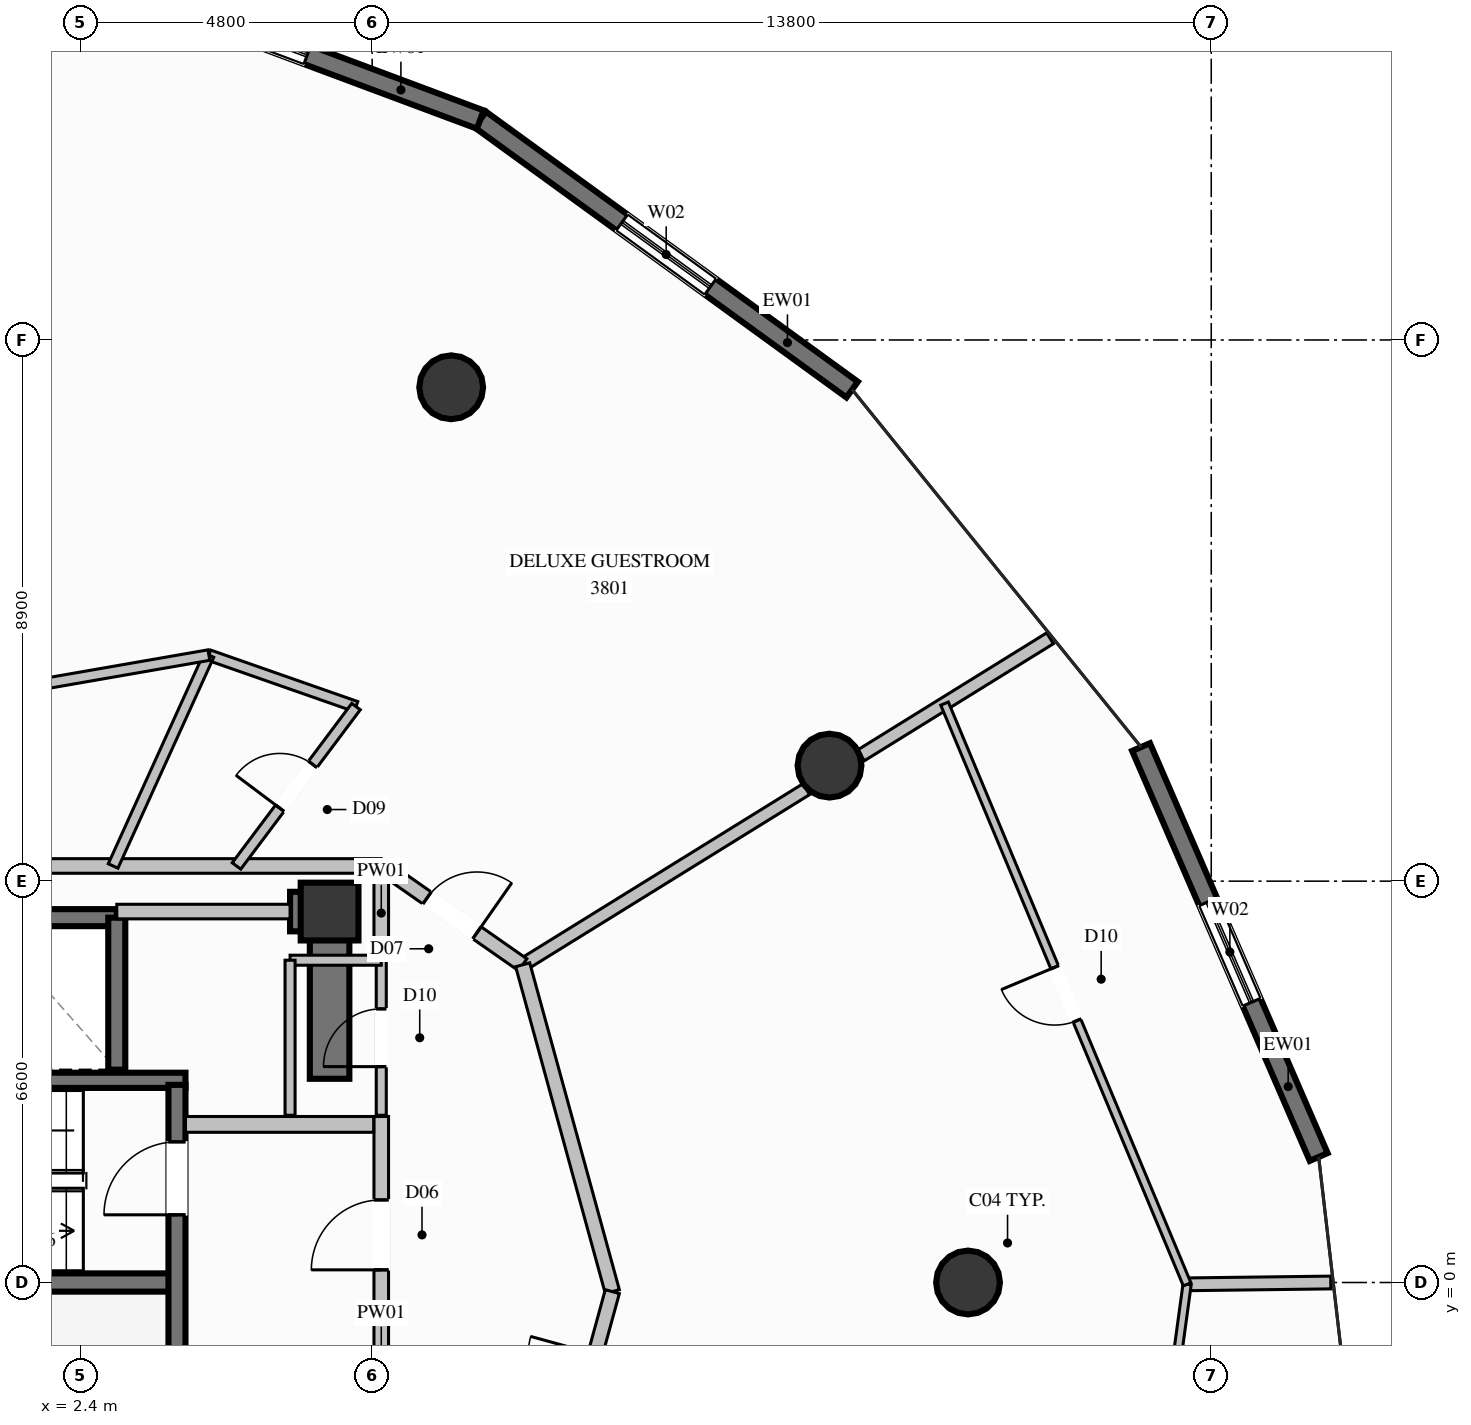
"""IFC4 building model, lengths in metres.
Left out: names, types, materials, properties, quantities, classifications, styles, units other than length and angle.
Written with IfcOpenShell. Run it as: python <this file> out.ifc"""

import sys

from ifc_helpers import new_model, si_unit, direction, frame, frame_2d, origin, origin_2d, place, context, subcontext, project, spatial, rectangle, circle, extrude, element, fill, save


model = new_model("IFC4")
c1 = context("Model", 3, precision=1e-05, world=origin(), true_north=direction((0.0, 1.0)))
c2 = subcontext(c1, "Body", "Model", "MODEL_VIEW")
j1 = project(units=[si_unit("LENGTHUNIT", "METRE"), si_unit("PLANEANGLEUNIT", "RADIAN")], contexts=[c1])
p1 = place(None, origin())
s1 = spatial("IfcSite", under=j1, at=p1, CompositionType="ELEMENT")
p2 = place(p1, origin())
s2 = spatial("IfcBuilding", under=s1, at=p2, CompositionType="ELEMENT")
p3 = place(p2, frame((0.0, 0.0, 142.2)))
s3 = spatial("IfcBuildingStorey", under=s2, at=p3, CompositionType="ELEMENT", Elevation=142.2)
p4 = place(p3, frame((6.5, 6.1, 0.0), z_axis=(0.0, 0.0, 1.0), x_axis=(1.0, 0.0, 0.0)))
e1 = element("IfcColumn", 1, at=p4, inside=s3, PredefinedType="COLUMN", context=c2, shape_type="SweptSolid", body=[
    extrude(rectangle(XDim=0.95, YDim=0.95, at=origin_2d()), origin(), (0.0, 0.0, 1.0), 3.6),
])
p5 = place(p3, frame((-3.99, 0.0, 0.0), z_axis=(0.0, 0.0, 1.0), x_axis=(1.0, 0.0, 0.0)))
e2 = element("IfcWall", 2, at=p5, inside=s3, PredefinedType="SHEAR", context=c2, shape_type="SweptSolid", body=[
    extrude(rectangle(XDim=7.98, YDim=0.3, at=frame_2d((3.99, 0.0))), origin(), (0.0, 0.0, 1.0), 3.6),
])
p6 = place(p3, frame((-4.13, 3.325, 0.0), z_axis=(0.0, 0.0, 1.0), x_axis=(1.0, 0.0, 0.0)))
e3 = element("IfcWall", 3, at=p6, inside=s3, PredefinedType="SOLIDWALL", context=c2, shape_type="SweptSolid", body=[
    extrude(rectangle(XDim=8.26, YDim=0.25, at=frame_2d((4.13, 0.0))), origin(), (0.0, 0.0, 1.0), 3.6),
])
p7 = place(p3, frame((5.85, 6.1, 0.0), z_axis=(0.0, 0.0, 1.0), x_axis=(1.0, 0.0, 0.0)))
e4 = element("IfcWall", 4, at=p7, inside=s3, PredefinedType="SHEAR", context=c2, shape_type="SweptSolid", body=[
    extrude(rectangle(XDim=0.325, YDim=0.65, at=frame_2d((0.163, 0.0))), origin(), (0.0, 0.0, 1.0), 3.6),
])
p8 = place(p3, frame((6.5, 3.35, 0.0), z_axis=(0.0, 0.0, 1.0), x_axis=(0.0, 1.0, 0.0)))
e5 = element("IfcWall", 5, at=p8, inside=s3, PredefinedType="SHEAR", context=c2, shape_type="SweptSolid", body=[
    extrude(rectangle(XDim=3.075, YDim=0.65, at=frame_2d((1.538, 0.0))), origin(), (0.0, 0.0, 1.0), 3.6),
])
for number, where, z_axis, x_axis in (
    (6, (17.0, 0.0, 0.0), (0.0, 0.0, 1.0), (1.0, 0.0, 0.0)),
    (7, (14.722, 8.5, 0.0), (0.0, 0.0, 1.0), (1.0, 0.0, 0.0)),
    (8, (8.5, 14.722, 0.0), (0.0, 0.0, 1.0), (1.0, 0.0, 0.0)),
):
    element("IfcColumn", number, at=place(p3, frame(where, z_axis=z_axis, x_axis=x_axis)), inside=s3, PredefinedType="COLUMN", context=c2, shape_type="SweptSolid", body=[
        extrude(circle(Radius=0.525, at=origin_2d()), origin(), (0.0, 0.0, 1.0), 3.6),
    ])
p9 = place(p3, frame((19.846, 8.805, 0.0), z_axis=(0.0, 0.0, 1.0), x_axis=(0.39761396578, -0.917552796419, 0.0)))
e9 = element("IfcWall", 9, at=p9, inside=s3, PredefinedType="SOLIDWALL", context=c2, shape_type="SweptSolid", body=[
    extrude(rectangle(XDim=7.347, YDim=0.32, at=frame_2d((3.673, 0.0))), origin(), (0.0, 0.0, 1.0), 3.35),
])
p10 = place(p9, frame((2.773, 0.0, 0.35)))
e10 = element("IfcOpeningElement", 10, at=p10, cuts=e9, PredefinedType="OPENING", context=c2, shape_type="SweptSolid", body=[
    extrude(rectangle(XDim=1.8, YDim=2.6, at=frame_2d((0.9, 1.3))), frame((0.0, 0.17, 0.0), z_axis=(0.0, -1.0, 0.0), x_axis=(1.0, 0.0, 0.0)), (0.0, 0.0, 1.0), 0.34),
])
p11 = place(p3, frame((8.978, 19.125, 0.0), z_axis=(0.0, 0.0, 1.0), x_axis=(0.809180040303, -0.587560773347, 0.0)))
e11 = element("IfcWall", 11, at=p11, inside=s3, PredefinedType="SOLIDWALL", context=c2, shape_type="SweptSolid", body=[
    extrude(rectangle(XDim=7.558, YDim=0.32, at=frame_2d((3.779, 0.0))), origin(), (0.0, 0.0, 1.0), 3.35),
])
p12 = place(p11, frame((2.879, 0.0, 0.35)))
e12 = element("IfcOpeningElement", 12, at=p12, cuts=e11, PredefinedType="OPENING", context=c2, shape_type="SweptSolid", body=[
    extrude(rectangle(XDim=1.8, YDim=2.6, at=frame_2d((0.9, 1.3))), frame((0.0, 0.17, 0.0), z_axis=(0.0, -1.0, 0.0), x_axis=(1.0, 0.0, 0.0)), (0.0, 0.0, 1.0), 0.34),
])
p13 = place(p3, frame((2.095, 21.695, 0.0), z_axis=(0.0, 0.0, 1.0), x_axis=(0.936823947669, -0.349801216512, 0.0)))
e13 = element("IfcWall", 13, at=p13, inside=s3, PredefinedType="SOLIDWALL", context=c2, shape_type="SweptSolid", body=[
    extrude(rectangle(XDim=7.347, YDim=0.32, at=frame_2d((3.674, 0.0))), origin(), (0.0, 0.0, 1.0), 3.35),
])
p14 = place(p13, frame((2.511, 0.0, 0.35)))
e14 = element("IfcOpeningElement", 14, at=p14, cuts=e13, PredefinedType="OPENING", context=c2, shape_type="SweptSolid", body=[
    extrude(rectangle(XDim=1.8, YDim=2.6, at=frame_2d((0.9, 1.3))), frame((0.0, 0.17, 0.0), z_axis=(0.0, -1.0, 0.0), x_axis=(1.0, 0.0, 0.0)), (0.0, 0.0, 1.0), 0.34),
])
p15 = place(p3, frame((3.0, 6.0, 0.0), z_axis=(0.0, 0.0, 1.0), x_axis=(-1.0, 0.0, 0.0)))
e15 = element("IfcWall", 15, at=p15, inside=s3, PredefinedType="SOLIDWALL", context=c2, shape_type="SweptSolid", body=[
    extrude(rectangle(XDim=2.2, YDim=0.28, at=frame_2d((1.1, 0.0))), origin(), (0.0, 0.0, 1.0), 3.35),
])
p16 = place(p3, frame((3.0, 3.5, 0.0), z_axis=(0.0, 0.0, 1.0), x_axis=(0.0, 1.0, 0.0)))
e16 = element("IfcWall", 16, at=p16, inside=s3, PredefinedType="SOLIDWALL", context=c2, shape_type="SweptSolid", body=[
    extrude(rectangle(XDim=2.5, YDim=0.28, at=frame_2d((1.25, 0.0))), origin(), (0.0, 0.0, 1.0), 3.35),
])
p17 = place(p3, frame((3.99, -2.21, 0.0), z_axis=(0.0, 0.0, 1.0), x_axis=(0.0, 1.0, 0.0)))
e17 = element("IfcWall", 17, at=p17, inside=s3, PredefinedType="SOLIDWALL", context=c2, shape_type="SweptSolid", body=[
    extrude(rectangle(XDim=5.46, YDim=0.28, at=frame_2d((2.73, 0.0))), origin(), (0.0, 0.0, 1.0), 3.35),
])
p18 = place(p17, frame((3.323, 0.0, 0.0)))
e18 = element("IfcOpeningElement", 18, at=p18, cuts=e17, PredefinedType="OPENING", context=c2, shape_type="SweptSolid", body=[
    extrude(rectangle(XDim=1.2, YDim=2.2, at=frame_2d((0.6, 1.1))), frame((0.0, 0.15, 0.0), z_axis=(0.0, -1.0, 0.0), x_axis=(1.0, 0.0, 0.0)), (0.0, 0.0, 1.0), 0.3),
])
p19 = place(p3, frame((7.35, -2.34, 0.0), z_axis=(0.0, 0.0, 1.0), x_axis=(0.0, 1.0, 0.0)))
e19 = element("IfcWall", 19, at=p19, inside=s3, PredefinedType="PARTITIONING", context=c2, shape_type="SweptSolid", body=[
    extrude(rectangle(XDim=5.07, YDim=0.24, at=frame_2d((2.535, 0.0))), origin(), (0.0, 0.0, 1.0), 2.435),
])
p20 = place(p19, frame((2.548, 0.0, 0.0)))
e20 = element("IfcOpeningElement", 20, at=p20, cuts=e19, PredefinedType="OPENING", context=c2, shape_type="SweptSolid", body=[
    extrude(rectangle(XDim=1.15, YDim=2.2, at=frame_2d((0.575, 1.1))), frame((0.0, 0.13, 0.0), z_axis=(0.0, -1.0, 0.0), x_axis=(1.0, 0.0, 0.0)), (0.0, 0.0, 1.0), 0.26),
])
p21 = place(p3, frame((4.13, 2.6, 0.0), z_axis=(0.0, 0.0, 1.0), x_axis=(1.0, 0.0, 0.0)))
e21 = element("IfcWall", 21, at=p21, inside=s3, PredefinedType="PARTITIONING", context=c2, shape_type="SweptSolid", body=[
    extrude(rectangle(XDim=3.095, YDim=0.26, at=frame_2d((1.548, 0.0))), origin(), (0.0, 0.0, 1.0), 3.35),
])
p22 = place(p3, frame((-7.35, 6.85, 0.0), z_axis=(0.0, 0.0, 1.0), x_axis=(1.0, 0.0, 0.0)))
e22 = element("IfcWall", 22, at=p22, inside=s3, PredefinedType="PARTITIONING", context=c2, shape_type="SweptSolid", body=[
    extrude(rectangle(XDim=14.7, YDim=0.24, at=frame_2d((7.35, 0.0))), origin(), (0.0, 0.0, 1.0), 2.435),
])
p23 = place(p3, frame((7.35, 5.3, 0.0), z_axis=(0.0, 0.0, 1.0), x_axis=(0.0, 1.0, 0.0)))
e23 = element("IfcWall", 23, at=p23, inside=s3, PredefinedType="PARTITIONING", context=c2, shape_type="SweptSolid", body=[
    extrude(rectangle(XDim=1.55, YDim=0.24, at=frame_2d((0.775, 0.0))), origin(), (0.0, 0.0, 1.0), 2.435),
])
p24 = place(p3, frame((3.0, 6.1, 0.0), z_axis=(0.0, 0.0, 1.0), x_axis=(1.0, 0.0, 0.0)))
e24 = element("IfcWall", 24, at=p24, inside=s3, PredefinedType="PARTITIONING", context=c2, shape_type="SweptSolid", body=[
    extrude(rectangle(XDim=2.85, YDim=0.24, at=frame_2d((1.425, 0.0))), origin(), (0.0, 0.0, 1.0), 2.435),
])
p25 = place(p3, frame((7.35, 2.75, 0.0), z_axis=(0.0, 0.0, 1.0), x_axis=(0.0, 1.0, 0.0)))
e25 = element("IfcWall", 25, at=p25, inside=s3, PredefinedType="PARTITIONING", context=c2, shape_type="SweptSolid", body=[
    extrude(rectangle(XDim=2.55, YDim=0.165, at=frame_2d((1.275, 0.0))), origin(), (0.0, 0.0, 1.0), 3.35),
])
p26 = place(p25, frame((0.8, 0.0, 0.0)))
e26 = element("IfcOpeningElement", 26, at=p26, cuts=e25, PredefinedType="OPENING", context=c2, shape_type="SweptSolid", body=[
    extrude(rectangle(XDim=0.95, YDim=2.1, at=frame_2d((0.475, 1.05))), frame((0.0, 0.093, 0.0), z_axis=(0.0, -1.0, 0.0), x_axis=(1.0, 0.0, 0.0)), (0.0, 0.0, 1.0), 0.185),
])
p27 = place(p3, frame((7.35, 5.3, 0.0), z_axis=(0.0, 0.0, 1.0), x_axis=(-1.0, 0.0, 0.0)))
e27 = element("IfcWall", 27, at=p27, inside=s3, PredefinedType="PARTITIONING", context=c2, shape_type="SweptSolid", body=[
    extrude(rectangle(XDim=1.5, YDim=0.165, at=frame_2d((0.75, 0.0))), origin(), (0.0, 0.0, 1.0), 2.435),
])
p28 = place(p3, frame((5.85, 5.3, 0.0), z_axis=(0.0, 0.0, 1.0), x_axis=(0.0, -1.0, 0.0)))
e28 = element("IfcWall", 28, at=p28, inside=s3, PredefinedType="PARTITIONING", context=c2, shape_type="SweptSolid", body=[
    extrude(rectangle(XDim=2.55, YDim=0.165, at=frame_2d((1.275, 0.0))), origin(), (0.0, 0.0, 1.0), 2.435),
])
p29 = place(p3, frame((9.676, 5.225, 0.0), z_axis=(0.0, 0.0, 1.0), x_axis=(0.850241428679, 0.526392926394, 0.0)))
e29 = element("IfcWall", 29, at=p29, inside=s3, PredefinedType="PARTITIONING", context=c2, shape_type="SweptSolid", body=[
    extrude(rectangle(XDim=5.484, YDim=0.21, at=frame_2d((2.742, 0.0))), origin(), (0.0, 0.0, 1.0), 2.718),
])
p30 = place(p3, frame((15.24, 8.669, 0.0), z_axis=(0.0, 0.0, 1.0), x_axis=(0.850222459569, 0.526423564484, 0.0)))
e30 = element("IfcWall", 30, at=p30, inside=s3, PredefinedType="PARTITIONING", context=c2, shape_type="SweptSolid", body=[
    extrude(rectangle(XDim=3.657, YDim=0.21, at=frame_2d((1.828, 0.0))), origin(), (0.0, 0.0, 1.0), 3.35),
])
p31 = place(p3, frame((4.515, 10.318, 0.0), z_axis=(0.0, 0.0, 1.0), x_axis=(0.943844996107, -0.330388594421, 0.0)))
e31 = element("IfcWall", 31, at=p31, inside=s3, PredefinedType="PLUMBINGWALL", context=c2, shape_type="SweptSolid", body=[
    extrude(rectangle(XDim=2.564, YDim=0.175, at=frame_2d((1.282, 0.0))), origin(), (0.0, 0.0, 1.0), 3.35),
])
p32 = place(p3, frame((4.515, 10.318, 0.0), z_axis=(0.0, 0.0, 1.0), x_axis=(-0.413493846923, -0.910506912965, 0.0)))
e32 = element("IfcWall", 32, at=p32, inside=s3, PredefinedType="PLUMBINGWALL", context=c2, shape_type="SweptSolid", body=[
    extrude(rectangle(XDim=3.809, YDim=0.175, at=frame_2d((1.904, 0.0))), origin(), (0.0, 0.0, 1.0), 3.35),
])
p33 = place(p3, frame((4.969, 6.85, 0.0), z_axis=(0.0, 0.0, 1.0), x_axis=(0.600083455504, 0.79993740157, 0.0)))
e33 = element("IfcWall", 33, at=p33, inside=s3, PredefinedType="PLUMBINGWALL", context=c2, shape_type="SweptSolid", body=[
    extrude(rectangle(XDim=3.276, YDim=0.175, at=frame_2d((1.638, 0.0))), origin(), (0.0, 0.0, 1.0), 2.718),
])
p34 = place(p33, frame((1.188, 0.0, 0.0)))
e34 = element("IfcOpeningElement", 34, at=p34, cuts=e33, PredefinedType="OPENING", context=c2, shape_type="SweptSolid", body=[
    extrude(rectangle(XDim=0.9, YDim=2.1, at=frame_2d((0.45, 1.05))), frame((0.0, 0.098, 0.0), z_axis=(0.0, -1.0, 0.0), x_axis=(1.0, 0.0, 0.0)), (0.0, 0.0, 1.0), 0.195),
])
p35 = place(p3, frame((7.35, 6.85, 0.0), z_axis=(0.0, 0.0, 1.0), x_axis=(0.819753050647, -0.57271715179, 0.0)))
e35 = element("IfcWall", 35, at=p35, inside=s3, PredefinedType="PARTITIONING", context=c2, shape_type="SweptSolid", body=[
    extrude(rectangle(XDim=2.837, YDim=0.24, at=frame_2d((1.419, 0.0))), origin(), (0.0, 0.0, 1.0), 3.35),
])
p36 = place(p35, frame((0.919, 0.0, 0.0)))
e36 = element("IfcOpeningElement", 36, at=p36, cuts=e35, PredefinedType="OPENING", context=c2, shape_type="SweptSolid", body=[
    extrude(rectangle(XDim=1.0, YDim=2.2, at=frame_2d((0.5, 1.1))), frame((0.0, 0.13, 0.0), z_axis=(0.0, -1.0, 0.0), x_axis=(1.0, 0.0, 0.0)), (0.0, 0.0, 1.0), 0.26),
])
p37 = place(p3, frame((0.117, 9.553, 0.0), z_axis=(0.0, 0.0, 1.0), x_axis=(0.985201316569, 0.171401183864, 0.0)))
e37 = element("IfcWall", 37, at=p37, inside=s3, PredefinedType="PLUMBINGWALL", context=c2, shape_type="SweptSolid", body=[
    extrude(rectangle(XDim=4.464, YDim=0.175, at=frame_2d((2.232, 0.0))), origin(), (0.0, 0.0, 1.0), 3.35),
])
p38 = place(p3, frame((20.603, -0.03, 0.0), z_axis=(0.0, 0.0, 1.0), x_axis=(0.999919264108, 0.012706898387, 0.0)))
e38 = element("IfcWall", 38, at=p38, inside=s3, PredefinedType="PARTITIONING", context=c2, shape_type="SweptSolid", body=[
    extrude(rectangle(XDim=2.363, YDim=0.21, at=frame_2d((1.182, 0.0))), origin(), (0.0, 0.0, 1.0), 3.35),
])
p39 = place(p3, frame((11.15, -0.15, 0.0), z_axis=(0.0, 0.0, 1.0), x_axis=(-0.264447801629, 0.964400000111, 0.0)))
e39 = element("IfcWall", 39, at=p39, inside=s3, PredefinedType="PARTITIONING", context=c2, shape_type="SweptSolid", body=[
    extrude(rectangle(XDim=5.573, YDim=0.24, at=frame_2d((2.787, 0.0))), origin(), (0.0, 0.0, 1.0), 3.35),
])
p40 = place(p3, frame((10.295, -3.268, 0.0), z_axis=(0.0, 0.0, 1.0), x_axis=(0.264433345006, 0.96440396414, 0.0)))
e40 = element("IfcWall", 40, at=p40, inside=s3, PredefinedType="PARTITIONING", context=c2, shape_type="SweptSolid", body=[
    extrude(rectangle(XDim=3.233, YDim=0.24, at=frame_2d((1.617, 0.0))), origin(), (0.0, 0.0, 1.0), 3.35),
])
p41 = place(p40, frame((1.067, 0.0, 0.0)))
e41 = element("IfcOpeningElement", 41, at=p41, cuts=e40, PredefinedType="OPENING", context=c2, shape_type="SweptSolid", body=[
    extrude(rectangle(XDim=1.1, YDim=2.3, at=frame_2d((0.55, 1.15))), frame((0.0, 0.13, 0.0), z_axis=(0.0, -1.0, 0.0), x_axis=(1.0, 0.0, 0.0)), (0.0, 0.0, 1.0), 0.26),
])
p42 = place(p3, frame((19.104, -11.018, 0.0), z_axis=(0.0, 0.0, 1.0), x_axis=(0.135171166516, 0.990822262438, 0.0)))
e42 = element("IfcWall", 42, at=p42, inside=s3, PredefinedType="PARTITIONING", context=c2, shape_type="SweptSolid", body=[
    extrude(rectangle(XDim=11.09, YDim=0.135, at=frame_2d((5.545, 0.0))), origin(), (0.0, 0.0, 1.0), 3.35),
])
p43 = place(p42, frame((5.07, 0.0, 0.0)))
e43 = element("IfcOpeningElement", 43, at=p43, cuts=e42, PredefinedType="OPENING", context=c2, shape_type="SweptSolid", body=[
    extrude(rectangle(XDim=0.95, YDim=2.1, at=frame_2d((0.475, 1.05))), frame((0.0, 0.078, 0.0), z_axis=(0.0, -1.0, 0.0), x_axis=(1.0, 0.0, 0.0)), (0.0, 0.0, 1.0), 0.155),
])
p44 = place(p3, frame((20.603, -0.03, 0.0), z_axis=(0.0, 0.0, 1.0), x_axis=(-0.385424249403, 0.922739480012, 0.0)))
e44 = element("IfcWall", 44, at=p44, inside=s3, PredefinedType="PARTITIONING", context=c2, shape_type="SweptSolid", body=[
    extrude(rectangle(XDim=10.35, YDim=0.135, at=frame_2d((5.175, 0.0))), origin(), (0.0, 0.0, 1.0), 3.35),
])
p45 = place(p44, frame((4.7, 0.0, 0.0)))
e45 = element("IfcOpeningElement", 45, at=p45, cuts=e44, PredefinedType="OPENING", context=c2, shape_type="SweptSolid", body=[
    extrude(rectangle(XDim=0.95, YDim=2.1, at=frame_2d((0.475, 1.05))), frame((0.0, 0.078, 0.0), z_axis=(0.0, -1.0, 0.0), x_axis=(1.0, 0.0, 0.0)), (0.0, 0.0, 1.0), 0.155),
])
p46 = place(p10, origin())
e46 = element("IfcWindow", 46, at=p46, inside=s3, PartitioningType="SINGLE_PANEL", PredefinedType="WINDOW", context=c2, shape_type="SweptSolid", body=[
    extrude(rectangle(XDim=1.8, YDim=2.6, at=frame_2d((0.9, 1.3))), frame((0.0, 0.03, 0.0), z_axis=(0.0, -1.0, 0.0), x_axis=(1.0, 0.0, 0.0)), (0.0, 0.0, 1.0), 0.06),
])
fill(e10, e46)
p47 = place(p12, origin())
e47 = element("IfcWindow", 47, at=p47, inside=s3, PartitioningType="SINGLE_PANEL", PredefinedType="WINDOW", context=c2, shape_type="SweptSolid", body=[
    extrude(rectangle(XDim=1.8, YDim=2.6, at=frame_2d((0.9, 1.3))), frame((0.0, 0.03, 0.0), z_axis=(0.0, -1.0, 0.0), x_axis=(1.0, 0.0, 0.0)), (0.0, 0.0, 1.0), 0.06),
])
fill(e12, e47)
p48 = place(p14, origin())
e48 = element("IfcWindow", 48, at=p48, inside=s3, PartitioningType="SINGLE_PANEL", PredefinedType="WINDOW", context=c2, shape_type="SweptSolid", body=[
    extrude(rectangle(XDim=1.8, YDim=2.6, at=frame_2d((0.9, 1.3))), frame((0.0, 0.03, 0.0), z_axis=(0.0, -1.0, 0.0), x_axis=(1.0, 0.0, 0.0)), (0.0, 0.0, 1.0), 0.06),
])
fill(e14, e48)
p49 = place(p18, origin())
e49 = element("IfcDoor", 49, at=p49, inside=s3, OperationType="SINGLE_SWING_LEFT", PredefinedType="DOOR", context=c2, shape_type="SweptSolid", body=[
    extrude(rectangle(XDim=1.2, YDim=2.2, at=frame_2d((0.6, 1.1))), frame((0.0, 0.025, 0.0), z_axis=(0.0, -1.0, 0.0), x_axis=(1.0, 0.0, 0.0)), (0.0, 0.0, 1.0), 0.05),
])
fill(e18, e49)
p50 = place(p20, origin())
e50 = element("IfcDoor", 50, at=p50, inside=s3, OperationType="SINGLE_SWING_LEFT", PredefinedType="DOOR", context=c2, shape_type="SweptSolid", body=[
    extrude(rectangle(XDim=1.15, YDim=2.2, at=frame_2d((0.575, 1.1))), frame((0.0, 0.025, 0.0), z_axis=(0.0, -1.0, 0.0), x_axis=(1.0, 0.0, 0.0)), (0.0, 0.0, 1.0), 0.05),
])
fill(e20, e50)
p51 = place(p26, origin())
e51 = element("IfcDoor", 51, at=p51, inside=s3, OperationType="SINGLE_SWING_LEFT", PredefinedType="DOOR", context=c2, shape_type="SweptSolid", body=[
    extrude(rectangle(XDim=0.95, YDim=2.1, at=frame_2d((0.475, 1.05))), frame((0.0, 0.025, 0.0), z_axis=(0.0, -1.0, 0.0), x_axis=(1.0, 0.0, 0.0)), (0.0, 0.0, 1.0), 0.05),
])
fill(e26, e51)
p52 = place(p34, origin())
e52 = element("IfcDoor", 52, at=p52, inside=s3, OperationType="SINGLE_SWING_LEFT", PredefinedType="DOOR", context=c2, shape_type="SweptSolid", body=[
    extrude(rectangle(XDim=0.9, YDim=2.1, at=frame_2d((0.45, 1.05))), frame((0.0, 0.025, 0.0), z_axis=(0.0, -1.0, 0.0), x_axis=(1.0, 0.0, 0.0)), (0.0, 0.0, 1.0), 0.05),
])
fill(e34, e52)
p53 = place(p36, origin())
e53 = element("IfcDoor", 53, at=p53, inside=s3, OperationType="SINGLE_SWING_RIGHT", PredefinedType="DOOR", context=c2, shape_type="SweptSolid", body=[
    extrude(rectangle(XDim=1.0, YDim=2.2, at=frame_2d((0.5, 1.1))), frame((0.0, 0.025, 0.0), z_axis=(0.0, -1.0, 0.0), x_axis=(1.0, 0.0, 0.0)), (0.0, 0.0, 1.0), 0.05),
])
fill(e36, e53)
p54 = place(p45, origin())
e54 = element("IfcDoor", 54, at=p54, inside=s3, OperationType="SINGLE_SWING_RIGHT", PredefinedType="DOOR", context=c2, shape_type="SweptSolid", body=[
    extrude(rectangle(XDim=0.95, YDim=2.1, at=frame_2d((0.475, 1.05))), frame((0.0, 0.025, 0.0), z_axis=(0.0, -1.0, 0.0), x_axis=(1.0, 0.0, 0.0)), (0.0, 0.0, 1.0), 0.05),
])
fill(e45, e54)
save(model, sys.argv[1])
